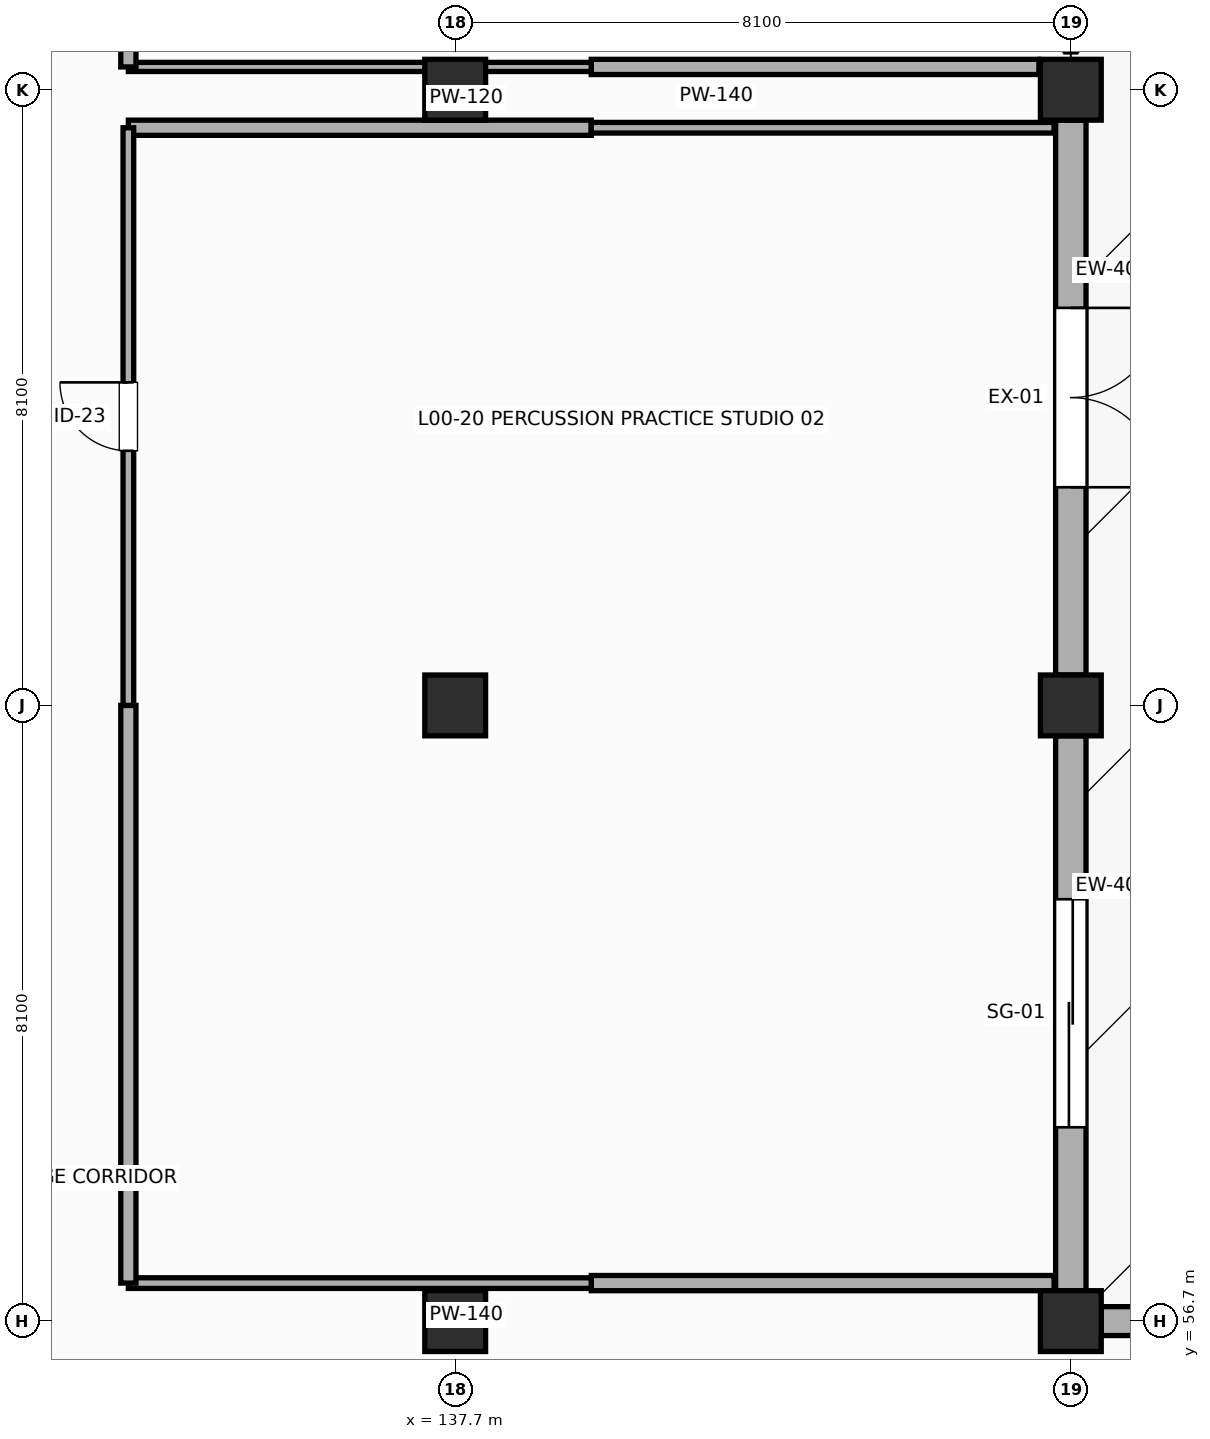
"""IFC4 building model, lengths in metres.
Left out: names, types, materials, properties, quantities, classifications, styles, units other than length and angle.
Written with IfcOpenShell. Run it as: python <this file> out.ifc"""

import sys

from ifc_helpers import new_model, si_unit, direction, frame, frame_2d, origin, origin_2d, place, context, subcontext, project, spatial, rectangle, extrude, element, fill, save


model = new_model("IFC4")
c1 = context("Model", 3, precision=1e-05, world=origin(), true_north=direction((0.0, 1.0)))
c2 = subcontext(c1, "Body", "Model", "MODEL_VIEW")
j1 = project(units=[si_unit("LENGTHUNIT", "METRE"), si_unit("PLANEANGLEUNIT", "RADIAN")], contexts=[c1])
p1 = place(None, origin())
s1 = spatial("IfcSite", under=j1, at=p1, CompositionType="ELEMENT")
p2 = place(p1, origin())
s2 = spatial("IfcBuilding", under=s1, at=p2, CompositionType="ELEMENT")
p3 = place(p2, origin())
s3 = spatial("IfcBuildingStorey", under=s2, at=p3, CompositionType="ELEMENT", Elevation=0.0)
for number, where, z_axis, x_axis in (
    (1, (137.7, 56.7, 0.0), (0.0, 0.0, 1.0), (1.0, 0.0, 0.0)),
    (2, (137.7, 64.8, 0.0), (0.0, 0.0, 1.0), (1.0, 0.0, 0.0)),
    (3, (137.7, 72.9, 0.0), (0.0, 0.0, 1.0), (1.0, 0.0, 0.0)),
    (4, (145.8, 56.7, 0.0), (0.0, 0.0, 1.0), (1.0, 0.0, 0.0)),
    (5, (145.8, 64.8, 0.0), (0.0, 0.0, 1.0), (1.0, 0.0, 0.0)),
    (6, (145.8, 72.9, 0.0), (0.0, 0.0, 1.0), (1.0, 0.0, 0.0)),
):
    element("IfcColumn", number, at=place(p3, frame(where, z_axis=z_axis, x_axis=x_axis)), inside=s3, PredefinedType="COLUMN", context=c2, shape_type="SweptSolid", body=[
        extrude(rectangle(XDim=0.8, YDim=0.8, at=origin_2d()), origin(), (0.0, 0.0, 1.0), 5.4),
    ])
p4 = place(p3, frame((145.8, 64.4, 0.0), z_axis=(0.0, 0.0, 1.0), x_axis=(0.0, -1.0, 0.0)))
e7 = element("IfcWall", 7, at=p4, inside=s3, PredefinedType="SOLIDWALL", context=c2, shape_type="SweptSolid", body=[
    extrude(rectangle(XDim=7.3, YDim=0.4, at=frame_2d((3.65, 0.0))), origin(), (0.0, 0.0, 1.0), 4.767),
])
p5 = place(p4, frame((2.15, 0.0, 0.0)))
e8 = element("IfcOpeningElement", 8, at=p5, cuts=e7, PredefinedType="OPENING", context=c2, shape_type="SweptSolid", body=[
    extrude(rectangle(XDim=3.0, YDim=3.2, at=frame_2d((1.5, 1.6))), frame((0.0, 0.21, 0.0), z_axis=(0.0, -1.0, 0.0), x_axis=(1.0, 0.0, 0.0)), (0.0, 0.0, 1.0), 0.42),
])
p6 = place(p3, frame((145.8, 72.5, 0.0), z_axis=(0.0, 0.0, 1.0), x_axis=(0.0, -1.0, 0.0)))
e9 = element("IfcWall", 9, at=p6, inside=s3, PredefinedType="SOLIDWALL", context=c2, shape_type="SweptSolid", body=[
    extrude(rectangle(XDim=7.3, YDim=0.4, at=frame_2d((3.65, 0.0))), origin(), (0.0, 0.0, 1.0), 4.767),
])
p7 = place(p6, frame((2.47, 0.0, 0.0)))
e10 = element("IfcOpeningElement", 10, at=p7, cuts=e9, PredefinedType="OPENING", context=c2, shape_type="SweptSolid", body=[
    extrude(rectangle(XDim=2.36, YDim=2.4, at=frame_2d((1.18, 1.2))), frame((0.0, 0.21, 0.0), z_axis=(0.0, -1.0, 0.0), x_axis=(1.0, 0.0, 0.0)), (0.0, 0.0, 1.0), 0.42),
])
p8 = place(p3, frame((153.55, 56.7, 0.0), z_axis=(0.0, 0.0, 1.0), x_axis=(-1.0, 0.0, 0.0)))
e11 = element("IfcWall", 11, at=p8, inside=s3, PredefinedType="SOLIDWALL", context=c2, shape_type="SweptSolid", body=[
    extrude(rectangle(XDim=7.35, YDim=0.38, at=frame_2d((3.675, 0.0))), origin(), (0.0, 0.0, 1.0), 4.747),
])
p9 = place(p8, frame((3.25, 0.0, 0.9)))
e12 = element("IfcOpeningElement", 12, at=p9, cuts=e11, PredefinedType="OPENING", context=c2, shape_type="SweptSolid", body=[
    extrude(rectangle(XDim=0.85, YDim=1.15, at=frame_2d((0.425, 0.575))), frame((0.0, 0.2, 0.0), z_axis=(0.0, -1.0, 0.0), x_axis=(1.0, 0.0, 0.0)), (0.0, 0.0, 1.0), 0.4),
])
p10 = place(p3, frame((133.4, 72.4, 0.0), z_axis=(0.0, 0.0, 1.0), x_axis=(1.0, 0.0, 0.0)))
e13 = element("IfcWall", 13, at=p10, inside=s3, PredefinedType="PARTITIONING", context=c2, shape_type="SweptSolid", body=[
    extrude(rectangle(XDim=6.09, YDim=0.2, at=frame_2d((3.045, 0.0))), origin(), (0.0, 0.0, 1.0), 5.12),
])
p11 = place(p3, frame((139.49, 72.4, 0.0), z_axis=(0.0, 0.0, 1.0), x_axis=(1.0, 0.0, 0.0)))
e14 = element("IfcWall", 14, at=p11, inside=s3, PredefinedType="PARTITIONING", context=c2, shape_type="SweptSolid", body=[
    extrude(rectangle(XDim=6.09, YDim=0.14, at=frame_2d((3.045, 0.0))), origin(), (0.0, 0.0, 1.0), 5.12),
])
p12 = place(p3, frame((145.58, 57.2, 0.0), z_axis=(0.0, 0.0, 1.0), x_axis=(-1.0, 0.0, 0.0)))
e15 = element("IfcWall", 15, at=p12, inside=s3, PredefinedType="PARTITIONING", context=c2, shape_type="SweptSolid", body=[
    extrude(rectangle(XDim=6.09, YDim=0.2, at=frame_2d((3.045, 0.0))), origin(), (0.0, 0.0, 1.0), 5.12),
])
p13 = place(p3, frame((139.49, 57.2, 0.0), z_axis=(0.0, 0.0, 1.0), x_axis=(-1.0, 0.0, 0.0)))
e16 = element("IfcWall", 16, at=p13, inside=s3, PredefinedType="PARTITIONING", context=c2, shape_type="SweptSolid", body=[
    extrude(rectangle(XDim=6.09, YDim=0.14, at=frame_2d((3.045, 0.0))), origin(), (0.0, 0.0, 1.0), 5.12),
])
p14 = place(p3, frame((133.4, 57.2, 0.0), z_axis=(0.0, 0.0, 1.0), x_axis=(0.0, 1.0, 0.0)))
e17 = element("IfcWall", 17, at=p14, inside=s3, PredefinedType="PARTITIONING", context=c2, shape_type="SweptSolid", body=[
    extrude(rectangle(XDim=7.6, YDim=0.2, at=frame_2d((3.8, 0.0))), origin(), (0.0, 0.0, 1.0), 5.12),
])
p15 = place(p3, frame((133.4, 64.8, 0.0), z_axis=(0.0, 0.0, 1.0), x_axis=(0.0, 1.0, 0.0)))
e18 = element("IfcWall", 18, at=p15, inside=s3, PredefinedType="PARTITIONING", context=c2, shape_type="SweptSolid", body=[
    extrude(rectangle(XDim=7.6, YDim=0.14, at=frame_2d((3.8, 0.0))), origin(), (0.0, 0.0, 1.0), 5.12),
])
p16 = place(p15, frame((3.35, 0.0, 0.0)))
e19 = element("IfcOpeningElement", 19, at=p16, cuts=e18, PredefinedType="OPENING", context=c2, shape_type="SweptSolid", body=[
    extrude(rectangle(XDim=0.9, YDim=2.2, at=frame_2d((0.45, 1.1))), frame((0.0, 0.08, 0.0), z_axis=(0.0, -1.0, 0.0), x_axis=(1.0, 0.0, 0.0)), (0.0, 0.0, 1.0), 0.16),
])
p17 = place(p3, frame((145.38, 73.2, 0.0), z_axis=(0.0, 0.0, 1.0), x_axis=(-1.0, 0.0, 0.0)))
e20 = element("IfcWall", 20, at=p17, inside=s3, PredefinedType="PARTITIONING", context=c2, shape_type="SweptSolid", body=[
    extrude(rectangle(XDim=5.89, YDim=0.2, at=frame_2d((2.945, 0.0))), origin(), (0.0, 0.0, 1.0), 4.58),
])
p18 = place(p3, frame((139.49, 73.2, 0.0), z_axis=(0.0, 0.0, 1.0), x_axis=(-1.0, 0.0, 0.0)))
e21 = element("IfcWall", 21, at=p18, inside=s3, PredefinedType="PARTITIONING", context=c2, shape_type="SweptSolid", body=[
    extrude(rectangle(XDim=6.09, YDim=0.12, at=frame_2d((3.045, 0.0))), origin(), (0.0, 0.0, 1.0), 4.224),
])
p19 = place(p3, frame((133.4, 73.2, 0.0), z_axis=(0.0, 0.0, 1.0), x_axis=(0.0, 1.0, 0.0)))
e22 = element("IfcWall", 22, at=p19, inside=s3, PredefinedType="PARTITIONING", context=c2, shape_type="SweptSolid", body=[
    extrude(rectangle(XDim=7.6, YDim=0.2, at=frame_2d((3.8, 0.0))), origin(), (0.0, 0.0, 1.0), 5.12),
])
p20 = place(p5, origin())
e23 = element("IfcDoor", 23, at=p20, inside=s3, OperationType="DOUBLE_DOOR_SINGLE_SWING", PredefinedType="GATE", context=c2, shape_type="SweptSolid", body=[
    extrude(rectangle(XDim=3.0, YDim=3.2, at=frame_2d((1.5, 1.6))), frame((0.0, 0.025, 0.0), z_axis=(0.0, -1.0, 0.0), x_axis=(1.0, 0.0, 0.0)), (0.0, 0.0, 1.0), 0.05),
])
fill(e8, e23)
p21 = place(p7, origin())
e24 = element("IfcDoor", 24, at=p21, inside=s3, OperationType="DOUBLE_DOOR_SINGLE_SWING", PredefinedType="DOOR", context=c2, shape_type="SweptSolid", body=[
    extrude(rectangle(XDim=2.36, YDim=2.4, at=frame_2d((1.18, 1.2))), frame((0.0, 0.025, 0.0), z_axis=(0.0, -1.0, 0.0), x_axis=(1.0, 0.0, 0.0)), (0.0, 0.0, 1.0), 0.05),
])
fill(e10, e24)
p22 = place(p16, origin())
e25 = element("IfcDoor", 25, at=p22, inside=s3, OperationType="SINGLE_SWING_RIGHT", PredefinedType="DOOR", context=c2, shape_type="SweptSolid", body=[
    extrude(rectangle(XDim=0.9, YDim=2.2, at=frame_2d((0.45, 1.1))), frame((0.0, 0.025, 0.0), z_axis=(0.0, -1.0, 0.0), x_axis=(1.0, 0.0, 0.0)), (0.0, 0.0, 1.0), 0.05),
])
fill(e19, e25)
save(model, sys.argv[1])
